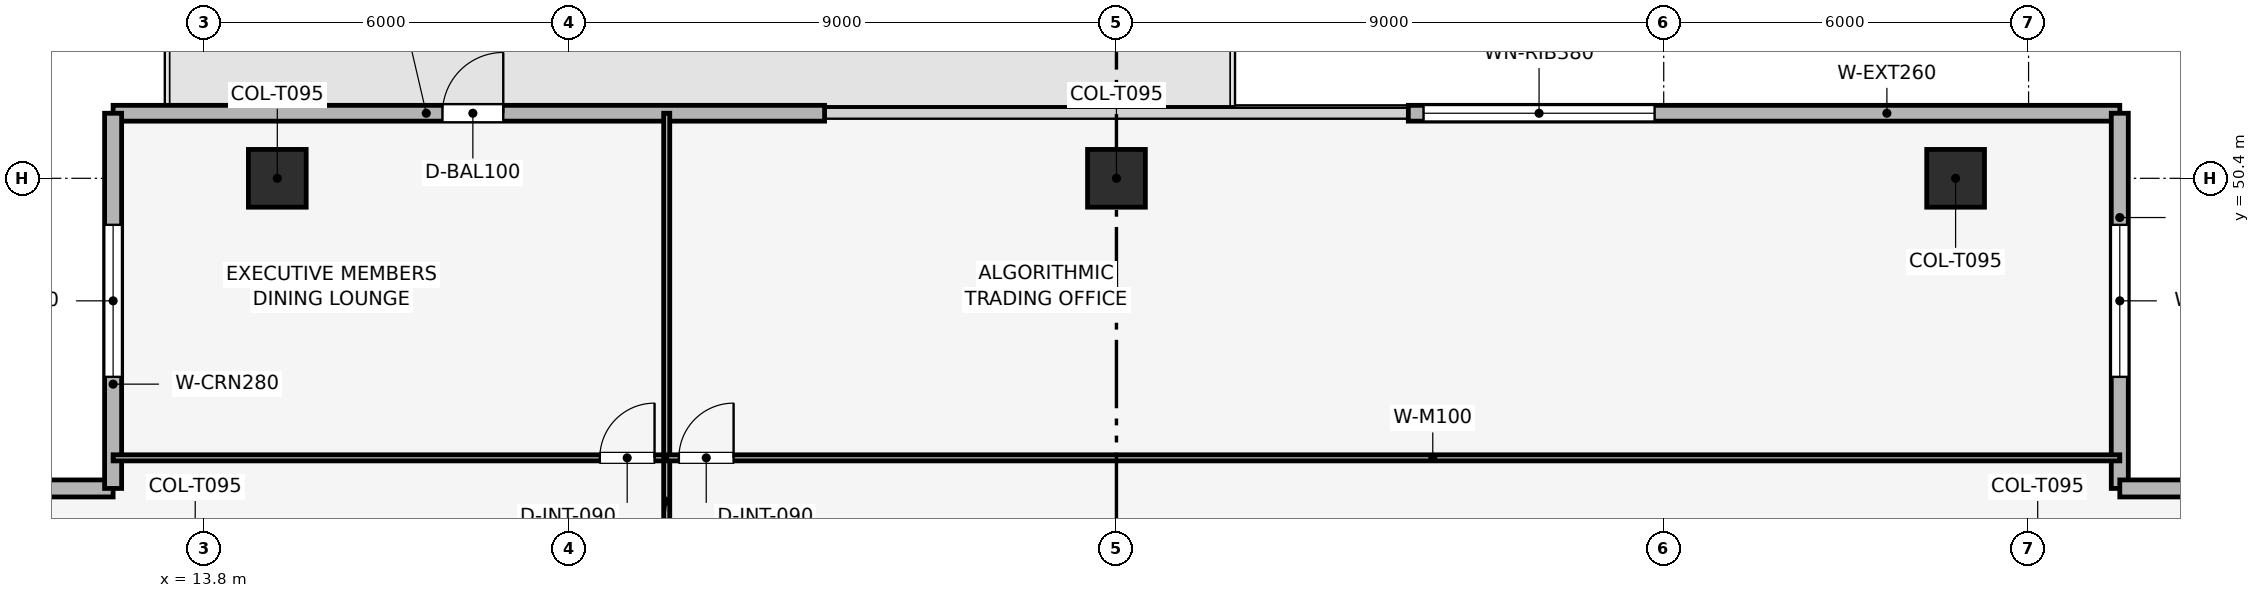
"""IFC4 building model, lengths in metres.
Left out: names, types, materials, properties, quantities, classifications, styles, units other than length and angle.
Written with IfcOpenShell. Run it as: python <this file> out.ifc"""

import sys

from ifc_helpers import new_model, si_unit, direction, frame, frame_2d, origin, origin_2d, place, context, subcontext, project, spatial, rectangle, extrude, element, fill, save


model = new_model("IFC4")
c1 = context("Model", 3, precision=1e-05, world=origin(), true_north=direction((0.0, 1.0)))
c2 = subcontext(c1, "Body", "Model", "MODEL_VIEW")
j1 = project(units=[si_unit("LENGTHUNIT", "METRE"), si_unit("PLANEANGLEUNIT", "RADIAN")], contexts=[c1])
p1 = place(None, origin())
s1 = spatial("IfcSite", under=j1, at=p1, CompositionType="ELEMENT")
p2 = place(p1, origin())
s2 = spatial("IfcBuilding", under=s1, at=p2, CompositionType="ELEMENT")
p3 = place(p2, frame((0.0, 0.0, 321.75)))
s3 = spatial("IfcBuildingStorey", under=s2, at=p3, CompositionType="ELEMENT", Elevation=321.75)
for number, where, z_axis, x_axis in (
    (1, (42.6, 50.4, 0.003), (0.0, 0.0, 1.0), (1.0, 0.0, 0.0)),
    (2, (28.8, 50.4, 0.003), (0.0, 0.0, 1.0), (1.0, 0.0, 0.0)),
    (3, (15.0, 50.4, 0.003), (0.0, 0.0, 1.0), (1.0, 0.0, 0.0)),
):
    element("IfcColumn", number, at=place(p3, frame(where, z_axis=z_axis, x_axis=x_axis)), inside=s3, PredefinedType="COLUMN", context=c2, shape_type="SweptSolid", body=[
        extrude(rectangle(XDim=0.95, YDim=0.95, at=origin_2d()), origin(), (0.0, 0.0, 1.0), 3.504),
    ])
p4 = place(p3, frame((12.3, 51.47, 0.0), z_axis=(0.0, 0.0, 1.0), x_axis=(1.0, 0.0, 0.0)))
e4 = element("IfcWall", 4, at=p4, inside=s3, PredefinedType="SOLIDWALL", context=c2, shape_type="SweptSolid", body=[
    extrude(rectangle(XDim=11.7, YDim=0.26, at=frame_2d((5.85, 0.0))), origin(), (0.0, 0.0, 1.0), 3.51),
])
p5 = place(p4, frame((5.416, 0.0, 0.0)))
e5 = element("IfcOpeningElement", 5, at=p5, cuts=e4, PredefinedType="OPENING", context=c2, shape_type="SweptSolid", body=[
    extrude(rectangle(XDim=1.0, YDim=2.2, at=frame_2d((0.5, 1.1))), frame((0.0, 0.14, 0.0), z_axis=(0.0, -1.0, 0.0), x_axis=(1.0, 0.0, 0.0)), (0.0, 0.0, 1.0), 0.28),
])
p6 = place(p3, frame((33.6, 51.47, 0.0), z_axis=(0.0, 0.0, 1.0), x_axis=(1.0, 0.0, 0.0)))
e6 = element("IfcWall", 6, at=p6, inside=s3, PredefinedType="SOLIDWALL", context=c2, shape_type="SweptSolid", body=[
    extrude(rectangle(XDim=11.7, YDim=0.26, at=frame_2d((5.85, 0.0))), origin(), (0.0, 0.0, 1.0), 3.51),
])
p7 = place(p6, frame((0.25, 0.0, 0.9)))
e7 = element("IfcOpeningElement", 7, at=p7, cuts=e6, PredefinedType="OPENING", context=c2, shape_type="SweptSolid", body=[
    extrude(rectangle(XDim=3.8, YDim=1.9, at=frame_2d((1.9, 0.95))), frame((0.0, 0.14, 0.0), z_axis=(0.0, -1.0, 0.0), x_axis=(1.0, 0.0, 0.0)), (0.0, 0.0, 1.0), 0.28),
])
p8 = place(p3, frame((6.13, 45.3, 0.0), z_axis=(0.0, 0.0, 1.0), x_axis=(1.0, 0.0, 0.0)))
e8 = element("IfcWall", 8, at=p8, inside=s3, PredefinedType="SOLIDWALL", context=c2, shape_type="SweptSolid", body=[
    extrude(rectangle(XDim=6.17, YDim=0.28, at=frame_2d((3.085, 0.0))), origin(), (0.0, 0.0, 1.0), 3.51),
])
p9 = place(p8, frame((1.835, 0.0, 0.9)))
e9 = element("IfcOpeningElement", 9, at=p9, cuts=e8, PredefinedType="OPENING", context=c2, shape_type="SweptSolid", body=[
    extrude(rectangle(XDim=2.5, YDim=1.9, at=frame_2d((1.25, 0.95))), frame((0.0, 0.15, 0.0), z_axis=(0.0, -1.0, 0.0), x_axis=(1.0, 0.0, 0.0)), (0.0, 0.0, 1.0), 0.3),
])
p10 = place(p3, frame((12.3, 45.3, 0.0), z_axis=(0.0, 0.0, 1.0), x_axis=(0.0, 1.0, 0.0)))
e10 = element("IfcWall", 10, at=p10, inside=s3, PredefinedType="SOLIDWALL", context=c2, shape_type="SweptSolid", body=[
    extrude(rectangle(XDim=6.17, YDim=0.28, at=frame_2d((3.085, 0.0))), origin(), (0.0, 0.0, 1.0), 3.51),
])
p11 = place(p10, frame((1.835, 0.0, 0.9)))
e11 = element("IfcOpeningElement", 11, at=p11, cuts=e10, PredefinedType="OPENING", context=c2, shape_type="SweptSolid", body=[
    extrude(rectangle(XDim=2.5, YDim=1.9, at=frame_2d((1.25, 0.95))), frame((0.0, 0.15, 0.0), z_axis=(0.0, -1.0, 0.0), x_axis=(1.0, 0.0, 0.0)), (0.0, 0.0, 1.0), 0.3),
])
p12 = place(p3, frame((45.3, 51.47, 0.0), z_axis=(0.0, 0.0, 1.0), x_axis=(0.0, -1.0, 0.0)))
e12 = element("IfcWall", 12, at=p12, inside=s3, PredefinedType="SOLIDWALL", context=c2, shape_type="SweptSolid", body=[
    extrude(rectangle(XDim=6.17, YDim=0.28, at=frame_2d((3.085, 0.0))), origin(), (0.0, 0.0, 1.0), 3.51),
])
p13 = place(p12, frame((1.835, 0.0, 0.9)))
e13 = element("IfcOpeningElement", 13, at=p13, cuts=e12, PredefinedType="OPENING", context=c2, shape_type="SweptSolid", body=[
    extrude(rectangle(XDim=2.5, YDim=1.9, at=frame_2d((1.25, 0.95))), frame((0.0, 0.15, 0.0), z_axis=(0.0, -1.0, 0.0), x_axis=(1.0, 0.0, 0.0)), (0.0, 0.0, 1.0), 0.3),
])
p14 = place(p3, frame((45.3, 45.3, 0.0), z_axis=(0.0, 0.0, 1.0), x_axis=(1.0, 0.0, 0.0)))
e14 = element("IfcWall", 14, at=p14, inside=s3, PredefinedType="SOLIDWALL", context=c2, shape_type="SweptSolid", body=[
    extrude(rectangle(XDim=6.17, YDim=0.28, at=frame_2d((3.085, 0.0))), origin(), (0.0, 0.0, 1.0), 3.51),
])
p15 = place(p14, frame((1.835, 0.0, 0.9)))
e15 = element("IfcOpeningElement", 15, at=p15, cuts=e14, PredefinedType="OPENING", context=c2, shape_type="SweptSolid", body=[
    extrude(rectangle(XDim=2.5, YDim=1.9, at=frame_2d((1.25, 0.95))), frame((0.0, 0.15, 0.0), z_axis=(0.0, -1.0, 0.0), x_axis=(1.0, 0.0, 0.0)), (0.0, 0.0, 1.0), 0.3),
])
p16 = place(p3, frame((12.3, 45.803, 0.0), z_axis=(0.0, 0.0, 1.0), x_axis=(1.0, 0.0, 0.0)))
e16 = element("IfcWall", 16, at=p16, inside=s3, PredefinedType="MOVABLE", context=c2, shape_type="SweptSolid", body=[
    extrude(rectangle(XDim=9.104, YDim=0.1, at=frame_2d((4.552, 0.0))), origin(), (0.0, 0.0, 1.0), 3.095),
])
p17 = place(p16, frame((8.004, 0.0, 0.0)))
e17 = element("IfcOpeningElement", 17, at=p17, cuts=e16, PredefinedType="OPENING", context=c2, shape_type="SweptSolid", body=[
    extrude(rectangle(XDim=0.9, YDim=2.1, at=frame_2d((0.45, 1.05))), frame((0.0, 0.06, 0.0), z_axis=(0.0, -1.0, 0.0), x_axis=(1.0, 0.0, 0.0)), (0.0, 0.0, 1.0), 0.12),
])
p18 = place(p3, frame((21.404, 39.7, 0.0), z_axis=(0.0, 0.0, 1.0), x_axis=(0.0, 1.0, 0.0)))
e18 = element("IfcWall", 18, at=p18, inside=s3, PredefinedType="MOVABLE", context=c2, shape_type="SweptSolid", body=[
    extrude(rectangle(XDim=11.77, YDim=0.1, at=frame_2d((5.885, 0.0))), origin(), (0.0, 0.0, 1.0), 3.135),
])
p19 = place(p3, frame((21.404, 45.803, 0.0), z_axis=(0.0, 0.0, 1.0), x_axis=(1.0, 0.0, 0.0)))
e19 = element("IfcWall", 19, at=p19, inside=s3, PredefinedType="MOVABLE", context=c2, shape_type="SweptSolid", body=[
    extrude(rectangle(XDim=23.896, YDim=0.1, at=frame_2d((11.948, 0.0))), origin(), (0.0, 0.0, 1.0), 3.095),
])
p20 = place(p19, frame((0.2, 0.0, 0.0)))
e20 = element("IfcOpeningElement", 20, at=p20, cuts=e19, PredefinedType="OPENING", context=c2, shape_type="SweptSolid", body=[
    extrude(rectangle(XDim=0.9, YDim=2.1, at=frame_2d((0.45, 1.05))), frame((0.0, 0.06, 0.0), z_axis=(0.0, -1.0, 0.0), x_axis=(1.0, 0.0, 0.0)), (0.0, 0.0, 1.0), 0.12),
])
p21 = place(p5, origin())
e21 = element("IfcDoor", 21, at=p21, inside=s3, OperationType="SINGLE_SWING_RIGHT", PredefinedType="DOOR", context=c2, shape_type="SweptSolid", body=[
    extrude(rectangle(XDim=1.0, YDim=2.2, at=frame_2d((0.5, 1.1))), frame((0.0, 0.025, 0.0), z_axis=(0.0, -1.0, 0.0), x_axis=(1.0, 0.0, 0.0)), (0.0, 0.0, 1.0), 0.05),
])
fill(e5, e21)
p22 = place(p7, origin())
e22 = element("IfcWindow", 22, at=p22, inside=s3, PartitioningType="SINGLE_PANEL", PredefinedType="WINDOW", context=c2, shape_type="SweptSolid", body=[
    extrude(rectangle(XDim=3.8, YDim=1.9, at=frame_2d((1.9, 0.95))), frame((0.0, 0.03, 0.0), z_axis=(0.0, -1.0, 0.0), x_axis=(1.0, 0.0, 0.0)), (0.0, 0.0, 1.0), 0.06),
])
fill(e7, e22)
p23 = place(p11, origin())
e23 = element("IfcWindow", 23, at=p23, inside=s3, PartitioningType="SINGLE_PANEL", PredefinedType="WINDOW", context=c2, shape_type="SweptSolid", body=[
    extrude(rectangle(XDim=2.5, YDim=1.9, at=frame_2d((1.25, 0.95))), frame((0.0, 0.03, 0.0), z_axis=(0.0, -1.0, 0.0), x_axis=(1.0, 0.0, 0.0)), (0.0, 0.0, 1.0), 0.06),
])
fill(e11, e23)
p24 = place(p13, origin())
e24 = element("IfcWindow", 24, at=p24, inside=s3, PartitioningType="SINGLE_PANEL", PredefinedType="WINDOW", context=c2, shape_type="SweptSolid", body=[
    extrude(rectangle(XDim=2.5, YDim=1.9, at=frame_2d((1.25, 0.95))), frame((0.0, 0.03, 0.0), z_axis=(0.0, -1.0, 0.0), x_axis=(1.0, 0.0, 0.0)), (0.0, 0.0, 1.0), 0.06),
])
fill(e13, e24)
p25 = place(p17, origin())
e25 = element("IfcDoor", 25, at=p25, inside=s3, OperationType="SINGLE_SWING_RIGHT", PredefinedType="DOOR", context=c2, shape_type="SweptSolid", body=[
    extrude(rectangle(XDim=0.9, YDim=2.1, at=frame_2d((0.45, 1.05))), frame((0.0, 0.025, 0.0), z_axis=(0.0, -1.0, 0.0), x_axis=(1.0, 0.0, 0.0)), (0.0, 0.0, 1.0), 0.05),
])
fill(e17, e25)
p26 = place(p20, origin())
e26 = element("IfcDoor", 26, at=p26, inside=s3, OperationType="SINGLE_SWING_RIGHT", PredefinedType="DOOR", context=c2, shape_type="SweptSolid", body=[
    extrude(rectangle(XDim=0.9, YDim=2.1, at=frame_2d((0.45, 1.05))), frame((0.0, 0.025, 0.0), z_axis=(0.0, -1.0, 0.0), x_axis=(1.0, 0.0, 0.0)), (0.0, 0.0, 1.0), 0.05),
])
fill(e20, e26)
save(model, sys.argv[1])
